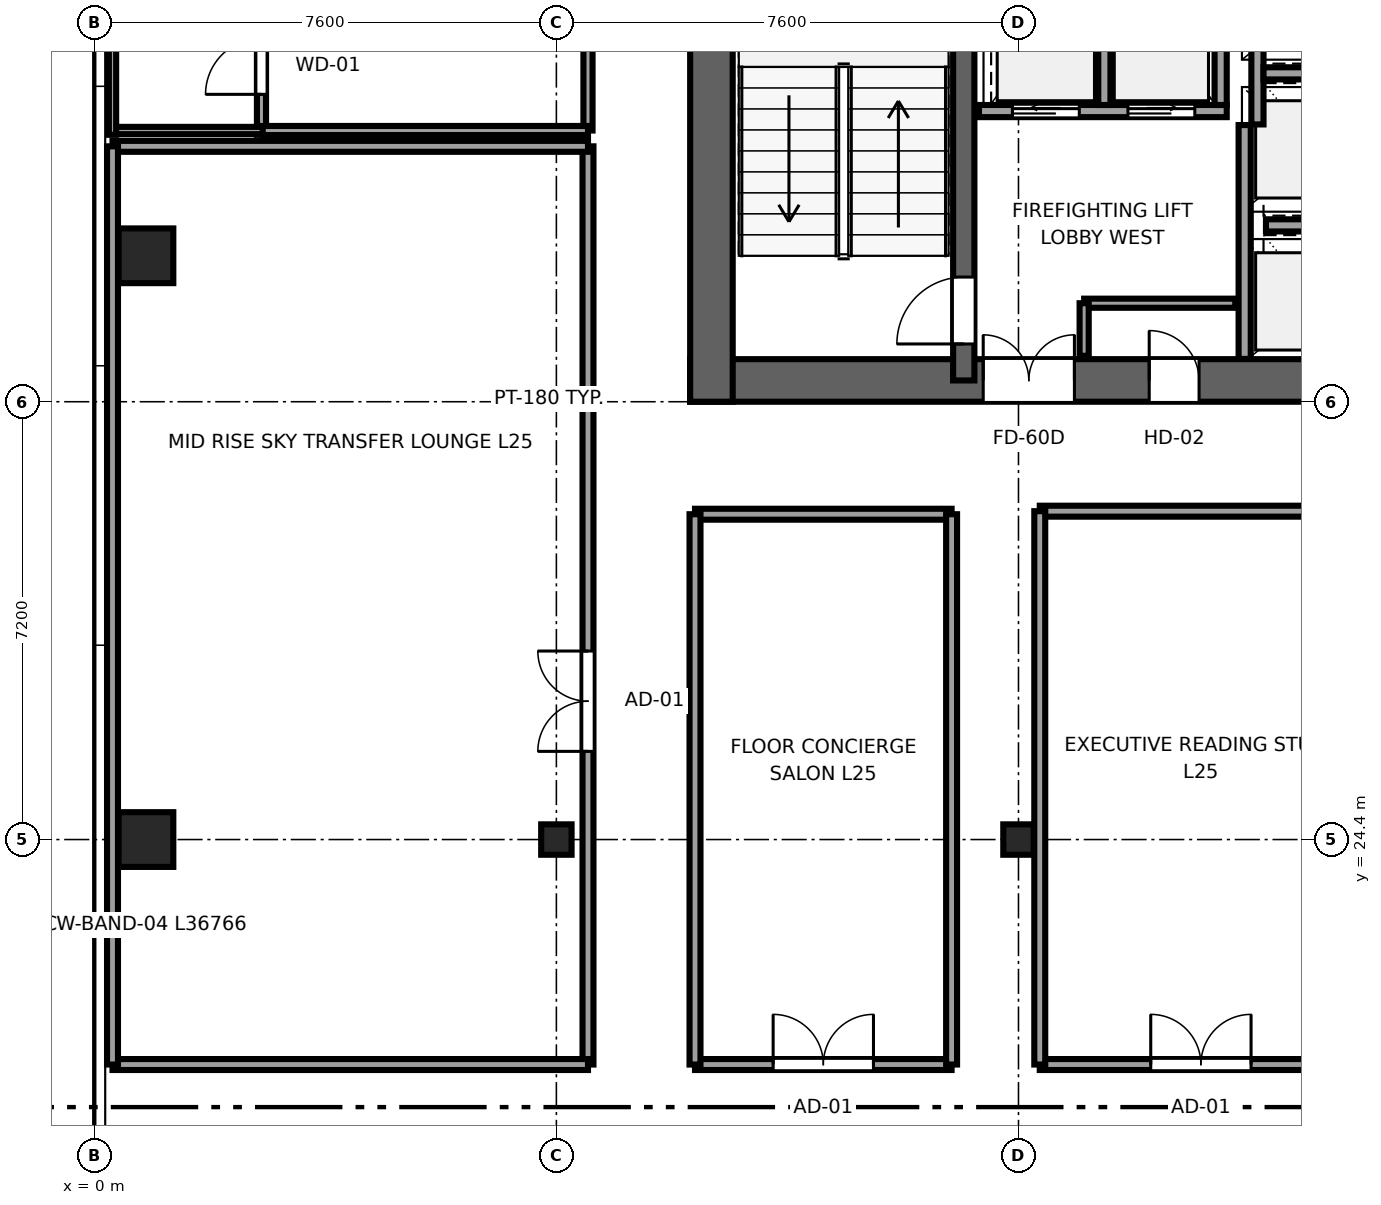
"""IFC4 building model, lengths in metres.
Left out: names, types, materials, properties, quantities, classifications, styles, units other than length and angle.
Written with IfcOpenShell. Run it as: python <this file> out.ifc"""

import sys

from ifc_helpers import new_model, si_unit, direction, frame, frame_2d, origin, origin_2d, place, context, subcontext, project, spatial, rectangle, i_section, extrude, source, transform, mapped, element, fill, save


model = new_model("IFC4")
c1 = context("Model", 3, precision=1e-05, world=origin(), true_north=direction((0.0, 1.0)))
c2 = subcontext(c1, "Body", "Model", "MODEL_VIEW")
j1 = project(units=[si_unit("LENGTHUNIT", "METRE"), si_unit("PLANEANGLEUNIT", "RADIAN")], contexts=[c1])
p1 = place(None, origin())
s1 = spatial("IfcSite", under=j1, at=p1, CompositionType="ELEMENT")
p2 = place(p1, origin())
s2 = spatial("IfcBuilding", under=s1, at=p2, CompositionType="ELEMENT")
p3 = place(p2, frame((0.0, 0.0, 100.9)))
s3 = spatial("IfcBuildingStorey", under=s2, at=p3, CompositionType="ELEMENT", Elevation=100.9)
p4 = place(p3, frame((9.8, 31.95, 0.0), z_axis=(0.0, 0.0, 1.0), x_axis=(1.0, 0.0, 0.0)))
e1 = element("IfcWall", 1, at=p4, inside=s3, PredefinedType="SHEAR", context=c2, shape_type="SweptSolid", body=[
    extrude(rectangle(XDim=26.4, YDim=0.7, at=frame_2d((13.2, 0.0))), origin(), (0.0, 0.0, 1.0), 3.55),
])
p5 = place(p4, frame((6.32, 0.0, 0.0), z_axis=(0.0, 0.0, 1.0), x_axis=(-1.0, 0.0, 0.0)))
e2 = element("IfcOpeningElement", 2, at=p5, cuts=e1, PredefinedType="OPENING", context=c2, shape_type="SweptSolid", body=[
    extrude(rectangle(XDim=1.5, YDim=2.04, at=frame_2d((0.75, 1.02))), frame((0.0, 0.36, 0.0), z_axis=(0.0, -1.0, 0.0), x_axis=(1.0, 0.0, 0.0)), (0.0, 0.0, 1.0), 0.72),
])
p6 = place(p4, frame((13.95, 0.0, 0.0), z_axis=(0.0, 0.0, 1.0), x_axis=(-1.0, 0.0, 0.0)))
e3 = element("IfcOpeningElement", 3, at=p6, cuts=e1, PredefinedType="OPENING", context=c2, shape_type="SweptSolid", body=[
    extrude(rectangle(XDim=1.5, YDim=2.04, at=frame_2d((0.75, 1.02))), frame((0.0, 0.36, 0.0), z_axis=(0.0, -1.0, 0.0), x_axis=(1.0, 0.0, 0.0)), (0.0, 0.0, 1.0), 0.72),
])
p7 = place(p4, frame((20.25, 0.0, 0.0), z_axis=(0.0, 0.0, 1.0), x_axis=(-1.0, 0.0, 0.0)))
e4 = element("IfcOpeningElement", 4, at=p7, cuts=e1, PredefinedType="OPENING", context=c2, shape_type="SweptSolid", body=[
    extrude(rectangle(XDim=1.5, YDim=2.04, at=frame_2d((0.75, 1.02))), frame((0.0, 0.36, 0.0), z_axis=(0.0, -1.0, 0.0), x_axis=(1.0, 0.0, 0.0)), (0.0, 0.0, 1.0), 0.72),
])
p8 = place(p4, frame((8.37, 0.0, 0.0), z_axis=(0.0, 0.0, 1.0), x_axis=(-1.0, 0.0, 0.0)))
e5 = element("IfcOpeningElement", 5, at=p8, cuts=e1, PredefinedType="OPENING", context=c2, shape_type="SweptSolid", body=[
    extrude(rectangle(XDim=0.82, YDim=2.01, at=frame_2d((0.41, 1.005))), frame((0.0, 0.36, 0.0), z_axis=(0.0, -1.0, 0.0), x_axis=(1.0, 0.0, 0.0)), (0.0, 0.0, 1.0), 0.72),
])
p9 = place(p3, frame((10.15, 31.6, 0.0), z_axis=(0.0, 0.0, 1.0), x_axis=(0.0, 1.0, 0.0)))
e6 = element("IfcWall", 6, at=p9, inside=s3, PredefinedType="SHEAR", context=c2, shape_type="SweptSolid", body=[
    extrude(rectangle(XDim=13.6, YDim=0.7, at=frame_2d((6.8, 0.0))), origin(), (0.0, 0.0, 1.0), 3.55),
])
p10 = place(p3, frame((14.3, 31.95, 0.0), z_axis=(0.0, 0.0, 1.0), x_axis=(0.0, 1.0, 0.0)))
e7 = element("IfcWall", 7, at=p10, inside=s3, PredefinedType="SHEAR", context=c2, shape_type="SweptSolid", body=[
    extrude(rectangle(XDim=12.9, YDim=0.35, at=frame_2d((6.45, 0.0))), origin(), (0.0, 0.0, 1.0), 3.55),
])
p11 = place(p10, frame((0.6, 0.0, 0.0)))
e8 = element("IfcOpeningElement", 8, at=p11, cuts=e7, PredefinedType="OPENING", context=c2, shape_type="SweptSolid", body=[
    extrude(rectangle(XDim=1.1, YDim=2.12, at=frame_2d((0.55, 1.06))), frame((0.0, 0.185, 0.0), z_axis=(0.0, -1.0, 0.0), x_axis=(1.0, 0.0, 0.0)), (0.0, 0.0, 1.0), 0.37),
])
m1 = source(origin(), c2, "Body", "SweptSolid", [
    extrude(rectangle(XDim=0.9, YDim=0.9, at=origin_2d()), origin(), (0.0, 0.0, 1.0), 3.55),
])
p12 = place(p3, frame((0.85, 24.4, 0.0), z_axis=(0.0, 0.0, 1.0), x_axis=(1.0, 0.0, 0.0)))
e9 = element("IfcColumn", 9, at=p12, inside=s3, PredefinedType="COLUMN", context=c2, shape_type="MappedRepresentation", body=[
    mapped(m1, transform((0.0, 0.0, 0.0), x_axis=(1.0, 0.0, 0.0), y_axis=(0.0, 1.0, 0.0), z_axis=(0.0, 0.0, 1.0), scale=1.0)),
])
m2 = source(origin(), c2, "Body", "SweptSolid", [
    extrude(i_section(OverallWidth=0.5, OverallDepth=0.5, WebThickness=0.022, FlangeThickness=0.034, at=origin_2d()), origin(), (0.0, 0.0, 1.0), 3.55),
])
for number, where, z_axis, x_axis in (
    (10, (7.6, 24.4, 0.0), (0.0, 0.0, 1.0), (1.0, 0.0, 0.0)),
    (11, (15.2, 24.4, 0.0), (0.0, 0.0, 1.0), (1.0, 0.0, 0.0)),
):
    element("IfcColumn", number, at=place(p3, frame(where, z_axis=z_axis, x_axis=x_axis)), inside=s3, PredefinedType="COLUMN", context=c2, shape_type="MappedRepresentation", body=[
        mapped(m2, transform((0.0, 0.0, 0.0), x_axis=(1.0, 0.0, 0.0), y_axis=(0.0, 1.0, 0.0), z_axis=(0.0, 0.0, 1.0), scale=1.0)),
    ])
p13 = place(p3, frame((0.85, 34.0, 0.0), z_axis=(0.0, 0.0, 1.0), x_axis=(1.0, 0.0, 0.0)))
e12 = element("IfcColumn", 12, at=p13, inside=s3, PredefinedType="COLUMN", context=c2, shape_type="MappedRepresentation", body=[
    mapped(m1, transform((0.0, 0.0, 0.0), x_axis=(1.0, 0.0, 0.0), y_axis=(0.0, 1.0, 0.0), z_axis=(0.0, 0.0, 1.0), scale=1.0)),
])
p14 = place(p3, frame((18.92, 32.304, 0.0), z_axis=(0.0, 0.0, 1.0), x_axis=(0.0, 1.0, 0.0)))
e13 = element("IfcWall", 13, at=p14, inside=s3, PredefinedType="SOLIDWALL", context=c2, shape_type="SweptSolid", body=[
    extrude(rectangle(XDim=3.846, YDim=0.2, at=frame_2d((1.923, 0.0))), origin(), (0.0, 0.0, 1.0), 3.37),
])
p15 = place(p3, frame((19.13, 36.16, 0.0), z_axis=(0.0, 0.0, 1.0), x_axis=(0.0, 1.0, 0.0)))
e14 = element("IfcWall", 14, at=p15, inside=s3, PredefinedType="SOLIDWALL", context=c2, shape_type="SweptSolid", body=[
    extrude(rectangle(XDim=8.336, YDim=0.2, at=frame_2d((4.168, 0.0))), origin(), (0.0, 0.0, 1.0), 3.37),
])
p16 = place(p3, frame((19.27, 34.5, 0.0), z_axis=(0.0, 0.0, 1.0), x_axis=(1.0, 0.0, 0.0)))
e15 = element("IfcWall", 15, at=p16, inside=s3, PredefinedType="SOLIDWALL", context=c2, shape_type="SweptSolid", body=[
    extrude(rectangle(XDim=1.8, YDim=0.2, at=frame_2d((0.9, 0.0))), origin(), (0.0, 0.0, 1.0), 3.37),
])
p17 = place(p3, frame((19.23, 37.0, 0.0), z_axis=(0.0, 0.0, 1.0), x_axis=(1.0, 0.0, 0.0)))
e16 = element("IfcWall", 16, at=p17, inside=s3, PredefinedType="SOLIDWALL", context=c2, shape_type="SweptSolid", body=[
    extrude(rectangle(XDim=1.84, YDim=0.2, at=frame_2d((0.92, 0.0))), origin(), (0.0, 0.0, 1.0), 3.37),
])
p18 = place(p3, frame((14.55, 36.38, 0.0), z_axis=(0.0, 0.0, 1.0), x_axis=(1.0, 0.0, 0.0)))
e17 = element("IfcWall", 17, at=p18, inside=s3, PredefinedType="SOLIDWALL", context=c2, shape_type="SweptSolid", body=[
    extrude(rectangle(XDim=4.075, YDim=0.2, at=frame_2d((2.038, 0.0))), origin(), (0.0, 0.0, 1.0), 3.37),
])
p19 = place(p18, frame((0.55, 0.0, 0.0)))
e18 = element("IfcOpeningElement", 18, at=p19, cuts=e17, PredefinedType="OPENING", context=c2, shape_type="SweptSolid", body=[
    extrude(rectangle(XDim=1.1, YDim=2.12, at=frame_2d((0.55, 1.06))), frame((0.0, 0.11, 0.0), z_axis=(0.0, -1.0, 0.0), x_axis=(1.0, 0.0, 0.0)), (0.0, 0.0, 1.0), 0.22),
])
p20 = place(p18, frame((2.45, 0.0, 0.0)))
e19 = element("IfcOpeningElement", 19, at=p20, cuts=e17, PredefinedType="OPENING", context=c2, shape_type="SweptSolid", body=[
    extrude(rectangle(XDim=1.1, YDim=2.12, at=frame_2d((0.55, 1.06))), frame((0.0, 0.11, 0.0), z_axis=(0.0, -1.0, 0.0), x_axis=(1.0, 0.0, 0.0)), (0.0, 0.0, 1.0), 0.22),
])
for number, where, z_axis, x_axis in (
    (20, (18.525, 36.48, 0.0), (0.0, 0.0, 1.0), (0.0, 1.0, 0.0)),
    (21, (16.613, 36.48, 0.0), (0.0, 0.0, 1.0), (0.0, 1.0, 0.0)),
):
    element("IfcWall", number, at=place(p3, frame(where, z_axis=z_axis, x_axis=x_axis)), inside=s3, PredefinedType="SOLIDWALL", context=c2, shape_type="SweptSolid", body=[
        extrude(rectangle(XDim=2.54, YDim=0.2, at=frame_2d((1.27, 0.0))), origin(), (0.0, 0.0, 1.0), 3.37),
    ])
p21 = place(p3, frame((2.75, 35.99, 0.0), z_axis=(0.0, 0.0, 1.0), x_axis=(0.0, 1.0, 0.0)))
e22 = element("IfcWall", 22, at=p21, inside=s3, PredefinedType="PARTITIONING", context=c2, shape_type="SweptSolid", body=[
    extrude(rectangle(XDim=2.39, YDim=0.15, at=frame_2d((1.195, 0.0))), origin(), (0.0, 0.0, 1.0), 3.37),
])
p22 = place(p21, frame((0.665, 0.0, 0.0)))
e23 = element("IfcOpeningElement", 23, at=p22, cuts=e22, PredefinedType="OPENING", context=c2, shape_type="SweptSolid", body=[
    extrude(rectangle(XDim=0.92, YDim=2.01, at=frame_2d((0.46, 1.005))), frame((0.0, 0.085, 0.0), z_axis=(0.0, -1.0, 0.0), x_axis=(1.0, 0.0, 0.0)), (0.0, 0.0, 1.0), 0.17),
])
p23 = place(p3, frame((0.23, 36.06, 0.0), z_axis=(0.0, 0.0, 1.0), x_axis=(1.0, 0.0, 0.0)))
e24 = element("IfcWall", 24, at=p23, inside=s3, PredefinedType="PLUMBINGWALL", context=c2, shape_type="SweptSolid", body=[
    extrude(rectangle(XDim=2.59, YDim=0.12, at=frame_2d((1.295, 0.0))), origin(), (0.0, 0.0, 1.0), 3.37),
])
p24 = place(p3, frame((0.3, 35.99, 0.0), z_axis=(0.0, 0.0, 1.0), x_axis=(0.0, 1.0, 0.0)))
e25 = element("IfcWall", 25, at=p24, inside=s3, PredefinedType="PLUMBINGWALL", context=c2, shape_type="SweptSolid", body=[
    extrude(rectangle(XDim=2.39, YDim=0.12, at=frame_2d((1.195, 0.0))), origin(), (0.0, 0.0, 1.0), 3.37),
])
p25 = place(p3, frame((16.28, 33.22, 0.0), z_axis=(0.0, 0.0, 1.0), x_axis=(1.0, 0.0, 0.0)))
e26 = element("IfcWall", 26, at=p25, inside=s3, PredefinedType="PARTITIONING", context=c2, shape_type="SweptSolid", body=[
    extrude(rectangle(XDim=2.485, YDim=0.15, at=frame_2d((1.242, 0.0))), origin(), (0.0, 0.0, 1.0), 3.37),
])
p26 = place(p3, frame((16.28, 32.355, 0.0), z_axis=(0.0, 0.0, 1.0), x_axis=(0.0, 1.0, 0.0)))
e27 = element("IfcWall", 27, at=p26, inside=s3, PredefinedType="PARTITIONING", context=c2, shape_type="SweptSolid", body=[
    extrude(rectangle(XDim=0.865, YDim=0.15, at=frame_2d((0.433, 0.0))), origin(), (0.0, 0.0, 1.0), 3.37),
])
p27 = place(p3, frame((8.12, 20.7, 0.0), z_axis=(0.0, 0.0, 1.0), x_axis=(0.0, 1.0, 0.0)))
e28 = element("IfcWall", 28, at=p27, inside=s3, PredefinedType="PARTITIONING", context=c2, shape_type="SweptSolid", body=[
    extrude(rectangle(XDim=15.1, YDim=0.18, at=frame_2d((7.55, 0.0))), origin(), (0.0, 0.0, 1.0), 3.37),
])
p28 = place(p27, frame((5.15, 0.0, 0.0)))
e29 = element("IfcOpeningElement", 29, at=p28, cuts=e28, PredefinedType="OPENING", context=c2, shape_type="SweptSolid", body=[
    extrude(rectangle(XDim=1.65, YDim=2.15, at=frame_2d((0.825, 1.075))), frame((0.0, 0.1, 0.0), z_axis=(0.0, -1.0, 0.0), x_axis=(1.0, 0.0, 0.0)), (0.0, 0.0, 1.0), 0.2),
])
for number, where, z_axis, x_axis in (
    (30, (0.3, 20.7, 0.0), (0.0, 0.0, 1.0), (1.0, 0.0, 0.0)),
    (31, (0.3, 35.8, 0.0), (0.0, 0.0, 1.0), (1.0, 0.0, 0.0)),
):
    element("IfcWall", number, at=place(p3, frame(where, z_axis=z_axis, x_axis=x_axis)), inside=s3, PredefinedType="PARTITIONING", context=c2, shape_type="SweptSolid", body=[
        extrude(rectangle(XDim=7.82, YDim=0.18, at=frame_2d((3.91, 0.0))), origin(), (0.0, 0.0, 1.0), 3.37),
    ])
p29 = place(p3, frame((0.3, 20.7, 0.0), z_axis=(0.0, 0.0, 1.0), x_axis=(0.0, 1.0, 0.0)))
e32 = element("IfcWall", 32, at=p29, inside=s3, PredefinedType="PARTITIONING", context=c2, shape_type="SweptSolid", body=[
    extrude(rectangle(XDim=15.1, YDim=0.18, at=frame_2d((7.55, 0.0))), origin(), (0.0, 0.0, 1.0), 3.37),
])
p30 = place(p3, frame((8.12, 36.06, 0.0), z_axis=(0.0, 0.0, 1.0), x_axis=(0.0, 1.0, 0.0)))
e33 = element("IfcWall", 33, at=p30, inside=s3, PredefinedType="PARTITIONING", context=c2, shape_type="SweptSolid", body=[
    extrude(rectangle(XDim=9.535, YDim=0.15, at=frame_2d((4.768, 0.0))), origin(), (0.0, 0.0, 1.0), 3.37),
])
p31 = place(p30, frame((3.53, 0.0, 0.0)))
e34 = element("IfcOpeningElement", 34, at=p31, cuts=e33, PredefinedType="OPENING", context=c2, shape_type="SweptSolid", body=[
    extrude(rectangle(XDim=0.98, YDim=2.12, at=frame_2d((0.49, 1.06))), frame((0.0, 0.085, 0.0), z_axis=(0.0, -1.0, 0.0), x_axis=(1.0, 0.0, 0.0)), (0.0, 0.0, 1.0), 0.17),
])
p32 = place(p3, frame((2.77, 36.06, 0.0), z_axis=(0.0, 0.0, 1.0), x_axis=(1.0, 0.0, 0.0)))
e35 = element("IfcWall", 35, at=p32, inside=s3, PredefinedType="PARTITIONING", context=c2, shape_type="SweptSolid", body=[
    extrude(rectangle(XDim=5.35, YDim=0.15, at=frame_2d((2.675, 0.0))), origin(), (0.0, 0.0, 1.0), 3.37),
])
p33 = place(p3, frame((9.88, 20.7, 0.0), z_axis=(0.0, 0.0, 1.0), x_axis=(1.0, 0.0, 0.0)))
e36 = element("IfcWall", 36, at=p33, inside=s3, PredefinedType="PARTITIONING", context=c2, shape_type="SweptSolid", body=[
    extrude(rectangle(XDim=4.22, YDim=0.18, at=frame_2d((2.11, 0.0))), origin(), (0.0, 0.0, 1.0), 3.37),
])
p34 = place(p33, frame((1.285, 0.0, 0.0)))
e37 = element("IfcOpeningElement", 37, at=p34, cuts=e36, PredefinedType="OPENING", context=c2, shape_type="SweptSolid", body=[
    extrude(rectangle(XDim=1.65, YDim=2.15, at=frame_2d((0.825, 1.075))), frame((0.0, 0.1, 0.0), z_axis=(0.0, -1.0, 0.0), x_axis=(1.0, 0.0, 0.0)), (0.0, 0.0, 1.0), 0.2),
])
p35 = place(p3, frame((9.88, 29.75, 0.0), z_axis=(0.0, 0.0, 1.0), x_axis=(1.0, 0.0, 0.0)))
e38 = element("IfcWall", 38, at=p35, inside=s3, PredefinedType="PARTITIONING", context=c2, shape_type="SweptSolid", body=[
    extrude(rectangle(XDim=4.22, YDim=0.18, at=frame_2d((2.11, 0.0))), origin(), (0.0, 0.0, 1.0), 3.37),
])
for number, where, z_axis, x_axis in (
    (39, (9.88, 20.7, 0.0), (0.0, 0.0, 1.0), (0.0, 1.0, 0.0)),
    (40, (14.1, 20.7, 0.0), (0.0, 0.0, 1.0), (0.0, 1.0, 0.0)),
):
    element("IfcWall", number, at=place(p3, frame(where, z_axis=z_axis, x_axis=x_axis)), inside=s3, PredefinedType="PARTITIONING", context=c2, shape_type="SweptSolid", body=[
        extrude(rectangle(XDim=9.05, YDim=0.18, at=frame_2d((4.525, 0.0))), origin(), (0.0, 0.0, 1.0), 3.37),
    ])
p36 = place(p3, frame((15.55, 20.7, 0.0), z_axis=(0.0, 0.0, 1.0), x_axis=(1.0, 0.0, 0.0)))
e41 = element("IfcWall", 41, at=p36, inside=s3, PredefinedType="PARTITIONING", context=c2, shape_type="SweptSolid", body=[
    extrude(rectangle(XDim=5.3, YDim=0.18, at=frame_2d((2.65, 0.0))), origin(), (0.0, 0.0, 1.0), 3.37),
])
p37 = place(p36, frame((1.825, 0.0, 0.0)))
e42 = element("IfcOpeningElement", 42, at=p37, cuts=e41, PredefinedType="OPENING", context=c2, shape_type="SweptSolid", body=[
    extrude(rectangle(XDim=1.65, YDim=2.15, at=frame_2d((0.825, 1.075))), frame((0.0, 0.1, 0.0), z_axis=(0.0, -1.0, 0.0), x_axis=(1.0, 0.0, 0.0)), (0.0, 0.0, 1.0), 0.2),
])
p38 = place(p3, frame((15.55, 29.8, 0.0), z_axis=(0.0, 0.0, 1.0), x_axis=(1.0, 0.0, 0.0)))
e43 = element("IfcWall", 43, at=p38, inside=s3, PredefinedType="PARTITIONING", context=c2, shape_type="SweptSolid", body=[
    extrude(rectangle(XDim=5.3, YDim=0.18, at=frame_2d((2.65, 0.0))), origin(), (0.0, 0.0, 1.0), 3.37),
])
p39 = place(p3, frame((15.55, 20.7, 0.0), z_axis=(0.0, 0.0, 1.0), x_axis=(0.0, 1.0, 0.0)))
e44 = element("IfcWall", 44, at=p39, inside=s3, PredefinedType="PARTITIONING", context=c2, shape_type="SweptSolid", body=[
    extrude(rectangle(XDim=9.1, YDim=0.18, at=frame_2d((4.55, 0.0))), origin(), (0.0, 0.0, 1.0), 3.37),
])
m3 = source(origin(), c2, "Body", "SweptSolid", [
    extrude(rectangle(XDim=1.1, YDim=2.12, at=frame_2d((0.55, 1.06))), frame((0.0, 0.025, 0.0), z_axis=(0.0, -1.0, 0.0), x_axis=(1.0, 0.0, 0.0)), (0.0, 0.0, 1.0), 0.05),
])
p40 = place(p11, origin())
e45 = element("IfcDoor", 45, at=p40, inside=s3, OperationType="SINGLE_SWING_LEFT", PredefinedType="DOOR", context=c2, shape_type="MappedRepresentation", body=[
    mapped(m3, transform((0.0, 0.0, 0.0), x_axis=(1.0, 0.0, 0.0), y_axis=(0.0, 1.0, 0.0), z_axis=(0.0, 0.0, 1.0), scale=1.0)),
])
fill(e8, e45)
m4 = source(origin(), c2, "Body", "SweptSolid", [
    extrude(rectangle(XDim=1.5, YDim=2.04, at=frame_2d((0.75, 1.02))), frame((0.0, 0.025, 0.0), z_axis=(0.0, -1.0, 0.0), x_axis=(1.0, 0.0, 0.0)), (0.0, 0.0, 1.0), 0.05),
])
p41 = place(p5, origin())
e46 = element("IfcDoor", 46, at=p41, inside=s3, OperationType="DOUBLE_DOOR_SINGLE_SWING", PredefinedType="DOOR", context=c2, shape_type="MappedRepresentation", body=[
    mapped(m4, transform((0.0, 0.0, 0.0), x_axis=(1.0, 0.0, 0.0), y_axis=(0.0, 1.0, 0.0), z_axis=(0.0, 0.0, 1.0), scale=1.0)),
])
fill(e2, e46)
m5 = source(origin(), c2, "Body", "SweptSolid", [
    extrude(rectangle(XDim=0.82, YDim=2.01, at=frame_2d((0.41, 1.005))), frame((0.0, 0.025, 0.0), z_axis=(0.0, -1.0, 0.0), x_axis=(1.0, 0.0, 0.0)), (0.0, 0.0, 1.0), 0.05),
])
p42 = place(p8, origin())
e47 = element("IfcDoor", 47, at=p42, inside=s3, OperationType="SINGLE_SWING_LEFT", PredefinedType="DOOR", context=c2, shape_type="MappedRepresentation", body=[
    mapped(m5, transform((0.0, 0.0, 0.0), x_axis=(1.0, 0.0, 0.0), y_axis=(0.0, 1.0, 0.0), z_axis=(0.0, 0.0, 1.0), scale=1.0)),
])
fill(e5, e47)
m6 = source(origin(), c2, "Body", "SweptSolid", [
    extrude(rectangle(XDim=1.1, YDim=2.12, at=frame_2d((0.55, 1.06))), frame((0.0, 0.025, 0.0), z_axis=(0.0, -1.0, 0.0), x_axis=(1.0, 0.0, 0.0)), (0.0, 0.0, 1.0), 0.05),
])
p43 = place(p19, origin())
e48 = element("IfcDoor", 48, at=p43, inside=s3, OperationType="SLIDING_TO_LEFT", PredefinedType="DOOR", context=c2, shape_type="MappedRepresentation", body=[
    mapped(m6, transform((0.0, 0.0, 0.0), x_axis=(1.0, 0.0, 0.0), y_axis=(0.0, 1.0, 0.0), z_axis=(0.0, 0.0, 1.0), scale=1.0)),
])
fill(e18, e48)
p44 = place(p20, origin())
e49 = element("IfcDoor", 49, at=p44, inside=s3, OperationType="SLIDING_TO_RIGHT", PredefinedType="DOOR", context=c2, shape_type="MappedRepresentation", body=[
    mapped(m6, transform((0.0, 0.0, 0.0), x_axis=(1.0, 0.0, 0.0), y_axis=(0.0, 1.0, 0.0), z_axis=(0.0, 0.0, 1.0), scale=1.0)),
])
fill(e19, e49)
m7 = source(origin(), c2, "Body", "SweptSolid", [
    extrude(rectangle(XDim=0.92, YDim=2.01, at=frame_2d((0.46, 1.005))), frame((0.0, 0.025, 0.0), z_axis=(0.0, -1.0, 0.0), x_axis=(1.0, 0.0, 0.0)), (0.0, 0.0, 1.0), 0.05),
])
p45 = place(p22, origin())
e50 = element("IfcDoor", 50, at=p45, inside=s3, OperationType="SINGLE_SWING_LEFT", PredefinedType="DOOR", context=c2, shape_type="MappedRepresentation", body=[
    mapped(m7, transform((0.0, 0.0, 0.0), x_axis=(1.0, 0.0, 0.0), y_axis=(0.0, 1.0, 0.0), z_axis=(0.0, 0.0, 1.0), scale=1.0)),
])
fill(e23, e50)
m8 = source(origin(), c2, "Body", "SweptSolid", [
    extrude(rectangle(XDim=1.65, YDim=2.15, at=frame_2d((0.825, 1.075))), frame((0.0, 0.025, 0.0), z_axis=(0.0, -1.0, 0.0), x_axis=(1.0, 0.0, 0.0)), (0.0, 0.0, 1.0), 0.05),
])
p46 = place(p28, origin())
e51 = element("IfcDoor", 51, at=p46, inside=s3, OperationType="DOUBLE_DOOR_SINGLE_SWING", PredefinedType="DOOR", context=c2, shape_type="MappedRepresentation", body=[
    mapped(m8, transform((0.0, 0.0, 0.0), x_axis=(1.0, 0.0, 0.0), y_axis=(0.0, 1.0, 0.0), z_axis=(0.0, 0.0, 1.0), scale=1.0)),
])
fill(e29, e51)
p47 = place(p34, origin())
e52 = element("IfcDoor", 52, at=p47, inside=s3, OperationType="DOUBLE_DOOR_SINGLE_SWING", PredefinedType="DOOR", context=c2, shape_type="MappedRepresentation", body=[
    mapped(m8, transform((0.0, 0.0, 0.0), x_axis=(1.0, 0.0, 0.0), y_axis=(0.0, 1.0, 0.0), z_axis=(0.0, 0.0, 1.0), scale=1.0)),
])
fill(e37, e52)
p48 = place(p37, origin())
e53 = element("IfcDoor", 53, at=p48, inside=s3, OperationType="DOUBLE_DOOR_SINGLE_SWING", PredefinedType="DOOR", context=c2, shape_type="MappedRepresentation", body=[
    mapped(m8, transform((0.0, 0.0, 0.0), x_axis=(1.0, 0.0, 0.0), y_axis=(0.0, 1.0, 0.0), z_axis=(0.0, 0.0, 1.0), scale=1.0)),
])
fill(e42, e53)
save(model, sys.argv[1])
